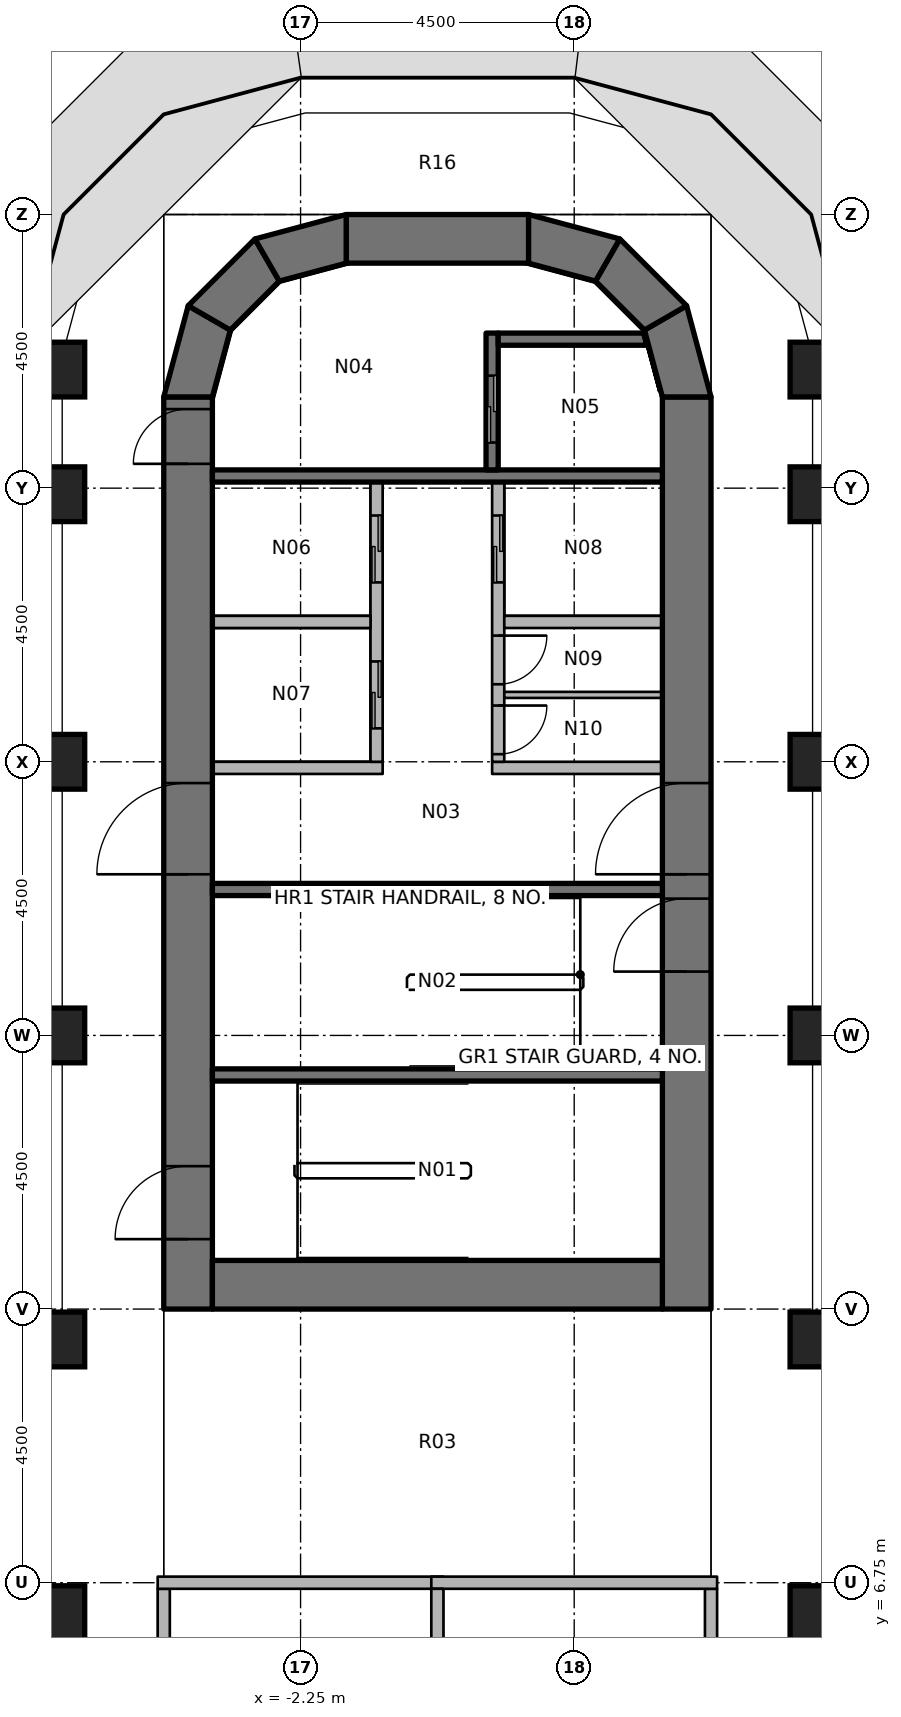
"""IFC4 building model, lengths in metres.
Left out: names, types, materials, properties, quantities, classifications, styles, units other than length and angle.
Written with IfcOpenShell. Run it as: python <this file> out.ifc"""

import sys

from ifc_helpers import new_model, si_unit, direction, frame, frame_2d, origin, origin_2d, place, context, subcontext, project, spatial, polyline, rectangle, outline, extrude, element, fill, save


model = new_model("IFC4")
c1 = context("Model", 3, precision=1e-05, world=origin(), true_north=direction((0.0, 1.0)))
c2 = subcontext(c1, "Body", "Model", "MODEL_VIEW")
j1 = project(units=[si_unit("LENGTHUNIT", "METRE"), si_unit("PLANEANGLEUNIT", "RADIAN")], contexts=[c1])
p1 = place(None, origin())
s1 = spatial("IfcSite", under=j1, at=p1, CompositionType="ELEMENT")
p2 = place(p1, origin())
s2 = spatial("IfcBuilding", under=s1, at=p2, CompositionType="ELEMENT")
p3 = place(p2, frame((0.0, 0.0, 128.4)))
s3 = spatial("IfcBuildingStorey", under=s2, at=p3, CompositionType="ELEMENT", Elevation=128.4)
for number, where, z_axis, x_axis in (
    (1, (-6.25, 6.25, 0.0), (0.0, 0.0, 1.0), (1.0, 0.0, 0.0)),
    (2, (-6.25, 10.75, 0.0), (0.0, 0.0, 1.0), (1.0, 0.0, 0.0)),
    (3, (-6.25, 15.75, 0.0), (0.0, 0.0, 1.0), (1.0, 0.0, 0.0)),
    (4, (-6.25, 20.25, 0.0), (0.0, 0.0, 1.0), (1.0, 0.0, 0.0)),
    (5, (-6.25, 24.65, 0.0), (0.0, 0.0, 1.0), (1.0, 0.0, 0.0)),
    (6, (-6.25, 26.7, 0.0), (0.0, 0.0, 1.0), (1.0, 0.0, 0.0)),
    (7, (6.25, 6.25, 0.0), (0.0, 0.0, 1.0), (1.0, 0.0, 0.0)),
    (8, (6.25, 10.75, 0.0), (0.0, 0.0, 1.0), (1.0, 0.0, 0.0)),
    (9, (6.25, 15.75, 0.0), (0.0, 0.0, 1.0), (1.0, 0.0, 0.0)),
    (10, (6.25, 20.25, 0.0), (0.0, 0.0, 1.0), (1.0, 0.0, 0.0)),
    (11, (6.25, 24.65, 0.0), (0.0, 0.0, 1.0), (1.0, 0.0, 0.0)),
    (12, (6.25, 26.7, 0.0), (0.0, 0.0, 1.0), (1.0, 0.0, 0.0)),
):
    element("IfcColumn", number, at=place(p3, frame(where, z_axis=z_axis, x_axis=x_axis)), inside=s3, PredefinedType="COLUMN", context=c2, shape_type="SweptSolid", body=[
        extrude(rectangle(XDim=0.9, YDim=0.9, at=origin_2d()), origin(), (0.0, 0.0, 1.0), 3.65),
    ])
p4 = place(p3, frame((-4.1, 11.25, 0.0), z_axis=(0.0, 0.0, 1.0), x_axis=(0.0, 1.0, 0.0)))
e13 = element("IfcWall", 13, at=p4, inside=s3, PredefinedType="SHEAR", context=c2, shape_type="SweptSolid", body=[
    extrude(rectangle(XDim=15.0, YDim=0.8, at=frame_2d((7.5, 0.0))), origin(), (0.0, 0.0, 1.0), 3.8),
])
p5 = place(p4, frame((7.15, 0.0, 0.0)))
e14 = element("IfcOpeningElement", 14, at=p5, cuts=e13, PredefinedType="OPENING", context=c2, shape_type="SweptSolid", body=[
    extrude(rectangle(XDim=1.5, YDim=2.3, at=frame_2d((0.75, 1.15))), frame((0.0, 0.41, 0.0), z_axis=(0.0, -1.0, 0.0), x_axis=(1.0, 0.0, 0.0)), (0.0, 0.0, 1.0), 0.82),
])
p6 = place(p4, frame((13.9, 0.0, 0.0)))
e15 = element("IfcOpeningElement", 15, at=p6, cuts=e13, PredefinedType="OPENING", context=c2, shape_type="SweptSolid", body=[
    extrude(rectangle(XDim=0.9, YDim=2.1, at=frame_2d((0.45, 1.05))), frame((0.0, 0.41, 0.0), z_axis=(0.0, -1.0, 0.0), x_axis=(1.0, 0.0, 0.0)), (0.0, 0.0, 1.0), 0.82),
])
p7 = place(p4, frame((1.15, 0.0, 0.0)))
e16 = element("IfcOpeningElement", 16, at=p7, cuts=e13, PredefinedType="OPENING", context=c2, shape_type="SweptSolid", body=[
    extrude(rectangle(XDim=1.2, YDim=2.1, at=frame_2d((0.6, 1.05))), frame((0.0, 0.41, 0.0), z_axis=(0.0, -1.0, 0.0), x_axis=(1.0, 0.0, 0.0)), (0.0, 0.0, 1.0), 0.82),
])
p8 = place(p3, frame((4.1, 11.25, 0.0), z_axis=(0.0, 0.0, 1.0), x_axis=(0.0, 1.0, 0.0)))
e17 = element("IfcWall", 17, at=p8, inside=s3, PredefinedType="SHEAR", context=c2, shape_type="SweptSolid", body=[
    extrude(rectangle(XDim=15.0, YDim=0.8, at=frame_2d((7.5, 0.0))), origin(), (0.0, 0.0, 1.0), 3.8),
])
p9 = place(p8, frame((7.15, 0.0, 0.0)))
e18 = element("IfcOpeningElement", 18, at=p9, cuts=e17, PredefinedType="OPENING", context=c2, shape_type="SweptSolid", body=[
    extrude(rectangle(XDim=1.5, YDim=2.3, at=frame_2d((0.75, 1.15))), frame((0.0, 0.41, 0.0), z_axis=(0.0, -1.0, 0.0), x_axis=(1.0, 0.0, 0.0)), (0.0, 0.0, 1.0), 0.82),
])
p10 = place(p8, frame((5.55, 0.0, 0.0)))
e19 = element("IfcOpeningElement", 19, at=p10, cuts=e17, PredefinedType="OPENING", context=c2, shape_type="SweptSolid", body=[
    extrude(rectangle(XDim=1.2, YDim=2.1, at=frame_2d((0.6, 1.05))), frame((0.0, 0.41, 0.0), z_axis=(0.0, -1.0, 0.0), x_axis=(1.0, 0.0, 0.0)), (0.0, 0.0, 1.0), 0.82),
])
p11 = place(p3, frame((-3.7, 11.65, 0.0), z_axis=(0.0, 0.0, 1.0), x_axis=(1.0, 0.0, 0.0)))
e20 = element("IfcWall", 20, at=p11, inside=s3, PredefinedType="SHEAR", context=c2, shape_type="SweptSolid", body=[
    extrude(rectangle(XDim=7.4, YDim=0.8, at=frame_2d((3.7, 0.0))), origin(), (0.0, 0.0, 1.0), 3.8),
])
p12 = place(p3, frame((-1.5, 28.85, 0.0), z_axis=(0.0, 0.0, 1.0), x_axis=(1.0, 0.0, 0.0)))
e21 = element("IfcWall", 21, at=p12, inside=s3, PredefinedType="SHEAR", context=c2, shape_type="SweptSolid", body=[
    extrude(rectangle(XDim=3.0, YDim=0.8, at=frame_2d((1.5, 0.0))), origin(), (0.0, 0.0, 1.0), 3.8),
])
p13 = place(p3, origin())
e22 = element("IfcWall", 22, at=p13, inside=s3, PredefinedType="SHEAR", context=c2, shape_type="SweptSolid", body=[
    extrude(outline(polyline([(-4.5, 26.25), (-4.098, 27.75), (-3.405, 27.35), (-3.7, 26.25), (-4.5, 26.25)])), origin(), (0.0, 0.0, 1.0), 3.8),
])
p14 = place(p3, origin())
e23 = element("IfcWall", 23, at=p14, inside=s3, PredefinedType="SHEAR", context=c2, shape_type="SweptSolid", body=[
    extrude(outline(polyline([(-4.098, 27.75), (-3.0, 28.848), (-2.6, 28.155), (-3.405, 27.35), (-4.098, 27.75)])), origin(), (0.0, 0.0, 1.0), 3.8),
])
p15 = place(p3, origin())
e24 = element("IfcWall", 24, at=p15, inside=s3, PredefinedType="SHEAR", context=c2, shape_type="SweptSolid", body=[
    extrude(outline(polyline([(-3.0, 28.848), (-1.5, 29.25), (-1.5, 28.45), (-2.6, 28.155), (-3.0, 28.848)])), origin(), (0.0, 0.0, 1.0), 3.8),
])
p16 = place(p3, origin())
e25 = element("IfcWall", 25, at=p16, inside=s3, PredefinedType="SHEAR", context=c2, shape_type="SweptSolid", body=[
    extrude(outline(polyline([(4.5, 26.25), (4.098, 27.75), (3.405, 27.35), (3.7, 26.25), (4.5, 26.25)])), origin(), (0.0, 0.0, 1.0), 3.8),
])
p17 = place(p3, origin())
e26 = element("IfcWall", 26, at=p17, inside=s3, PredefinedType="SHEAR", context=c2, shape_type="SweptSolid", body=[
    extrude(outline(polyline([(4.098, 27.75), (3.0, 28.848), (2.6, 28.155), (3.405, 27.35), (4.098, 27.75)])), origin(), (0.0, 0.0, 1.0), 3.8),
])
p18 = place(p3, origin())
e27 = element("IfcWall", 27, at=p18, inside=s3, PredefinedType="SHEAR", context=c2, shape_type="SweptSolid", body=[
    extrude(outline(polyline([(3.0, 28.848), (1.5, 29.25), (1.5, 28.45), (2.6, 28.155), (3.0, 28.848)])), origin(), (0.0, 0.0, 1.0), 3.8),
])
p19 = place(p3, frame((-3.7, 24.95, 0.0), z_axis=(0.0, 0.0, 1.0), x_axis=(1.0, 0.0, 0.0)))
e28 = element("IfcWall", 28, at=p19, inside=s3, PredefinedType="SHEAR", context=c2, shape_type="SweptSolid", body=[
    extrude(rectangle(XDim=7.4, YDim=0.2, at=frame_2d((3.7, 0.0))), origin(), (0.0, 0.0, 1.0), 3.65),
])
p20 = place(p3, frame((0.9, 27.3, 0.0), z_axis=(0.0, 0.0, 1.0), x_axis=(0.0, -1.0, 0.0)))
e29 = element("IfcWall", 29, at=p20, inside=s3, PredefinedType="SHEAR", context=c2, shape_type="SweptSolid", body=[
    extrude(rectangle(XDim=2.25, YDim=0.2, at=frame_2d((1.125, 0.0))), origin(), (0.0, 0.0, 1.0), 3.65),
])
p21 = place(p20, frame((0.7, 0.0, 0.0)))
e30 = element("IfcOpeningElement", 30, at=p21, cuts=e29, PredefinedType="OPENING", context=c2, shape_type="SweptSolid", body=[
    extrude(rectangle(XDim=1.1, YDim=2.3, at=frame_2d((0.55, 1.15))), frame((0.0, 0.11, 0.0), z_axis=(0.0, -1.0, 0.0), x_axis=(1.0, 0.0, 0.0)), (0.0, 0.0, 1.0), 0.22),
])
p22 = place(p3, origin())
e31 = element("IfcWall", 31, at=p22, inside=s3, PredefinedType="SHEAR", context=c2, shape_type="SweptSolid", body=[
    extrude(outline(polyline([(1.0, 27.1), (3.444, 27.1), (3.39, 27.3), (1.0, 27.3), (1.0, 27.1)])), origin(), (0.0, 0.0, 1.0), 3.65),
])
for number, where, z_axis, x_axis in (
    (32, (-3.7, 18.15, 0.0), (0.0, 0.0, 1.0), (1.0, 0.0, 0.0)),
    (33, (-3.7, 15.1, 0.0), (0.0, 0.0, 1.0), (1.0, 0.0, 0.0)),
):
    element("IfcWall", number, at=place(p3, frame(where, z_axis=z_axis, x_axis=x_axis)), inside=s3, PredefinedType="SHEAR", context=c2, shape_type="SweptSolid", body=[
        extrude(rectangle(XDim=7.4, YDim=0.2, at=frame_2d((3.7, 0.0))), origin(), (0.0, 0.0, 1.0), 3.65),
    ])
p23 = place(p3, frame((-3.7, 20.15, 0.0), z_axis=(0.0, 0.0, 1.0), x_axis=(1.0, 0.0, 0.0)))
e34 = element("IfcWall", 34, at=p23, inside=s3, PredefinedType="PARTITIONING", context=c2, shape_type="SweptSolid", body=[
    extrude(rectangle(XDim=2.8, YDim=0.2, at=frame_2d((1.4, 0.0))), origin(), (0.0, 0.0, 1.0), 3.65),
])
p24 = place(p3, frame((-1.0, 24.85, 0.0), z_axis=(0.0, 0.0, 1.0), x_axis=(0.0, -1.0, 0.0)))
e35 = element("IfcWall", 35, at=p24, inside=s3, PredefinedType="PARTITIONING", context=c2, shape_type="SweptSolid", body=[
    extrude(rectangle(XDim=4.6, YDim=0.2, at=frame_2d((2.3, 0.0))), origin(), (0.0, 0.0, 1.0), 3.65),
])
p25 = place(p24, frame((0.55, 0.0, 0.0)))
e36 = element("IfcOpeningElement", 36, at=p25, cuts=e35, PredefinedType="OPENING", context=c2, shape_type="SweptSolid", body=[
    extrude(rectangle(XDim=1.1, YDim=2.3, at=frame_2d((0.55, 1.15))), frame((0.0, 0.11, 0.0), z_axis=(0.0, -1.0, 0.0), x_axis=(1.0, 0.0, 0.0)), (0.0, 0.0, 1.0), 0.22),
])
p26 = place(p24, frame((2.95, 0.0, 0.0)))
e37 = element("IfcOpeningElement", 37, at=p26, cuts=e35, PredefinedType="OPENING", context=c2, shape_type="SweptSolid", body=[
    extrude(rectangle(XDim=1.1, YDim=2.3, at=frame_2d((0.55, 1.15))), frame((0.0, 0.11, 0.0), z_axis=(0.0, -1.0, 0.0), x_axis=(1.0, 0.0, 0.0)), (0.0, 0.0, 1.0), 0.22),
])
p27 = place(p3, frame((0.9, 20.15, 0.0), z_axis=(0.0, 0.0, 1.0), x_axis=(1.0, 0.0, 0.0)))
e38 = element("IfcWall", 38, at=p27, inside=s3, PredefinedType="PARTITIONING", context=c2, shape_type="SweptSolid", body=[
    extrude(rectangle(XDim=2.8, YDim=0.2, at=frame_2d((1.4, 0.0))), origin(), (0.0, 0.0, 1.0), 3.65),
])
p28 = place(p3, frame((1.0, 24.85, 0.0), z_axis=(0.0, 0.0, 1.0), x_axis=(0.0, -1.0, 0.0)))
e39 = element("IfcWall", 39, at=p28, inside=s3, PredefinedType="PARTITIONING", context=c2, shape_type="SweptSolid", body=[
    extrude(rectangle(XDim=4.6, YDim=0.2, at=frame_2d((2.3, 0.0))), origin(), (0.0, 0.0, 1.0), 3.65),
])
p29 = place(p28, frame((0.55, 0.0, 0.0)))
e40 = element("IfcOpeningElement", 40, at=p29, cuts=e39, PredefinedType="OPENING", context=c2, shape_type="SweptSolid", body=[
    extrude(rectangle(XDim=1.1, YDim=2.3, at=frame_2d((0.55, 1.15))), frame((0.0, 0.11, 0.0), z_axis=(0.0, -1.0, 0.0), x_axis=(1.0, 0.0, 0.0)), (0.0, 0.0, 1.0), 0.22),
])
p30 = place(p28, frame((2.525, 0.0, 0.0)))
e41 = element("IfcOpeningElement", 41, at=p30, cuts=e39, PredefinedType="OPENING", context=c2, shape_type="SweptSolid", body=[
    extrude(rectangle(XDim=0.8, YDim=2.1, at=frame_2d((0.4, 1.05))), frame((0.0, 0.11, 0.0), z_axis=(0.0, -1.0, 0.0), x_axis=(1.0, 0.0, 0.0)), (0.0, 0.0, 1.0), 0.22),
])
p31 = place(p28, frame((3.675, 0.0, 0.0)))
e42 = element("IfcOpeningElement", 42, at=p31, cuts=e39, PredefinedType="OPENING", context=c2, shape_type="SweptSolid", body=[
    extrude(rectangle(XDim=0.8, YDim=2.1, at=frame_2d((0.4, 1.05))), frame((0.0, 0.11, 0.0), z_axis=(0.0, -1.0, 0.0), x_axis=(1.0, 0.0, 0.0)), (0.0, 0.0, 1.0), 0.22),
])
for number, where, z_axis, x_axis in (
    (43, (-3.7, 22.55, 0.0), (0.0, 0.0, 1.0), (1.0, 0.0, 0.0)),
    (44, (1.1, 22.55, 0.0), (0.0, 0.0, 1.0), (1.0, 0.0, 0.0)),
):
    element("IfcWall", number, at=place(p3, frame(where, z_axis=z_axis, x_axis=x_axis)), inside=s3, PredefinedType="PARTITIONING", context=c2, shape_type="SweptSolid", body=[
        extrude(rectangle(XDim=2.6, YDim=0.2, at=frame_2d((1.3, 0.0))), origin(), (0.0, 0.0, 1.0), 3.65),
    ])
p32 = place(p3, frame((1.1, 21.35, 0.0), z_axis=(0.0, 0.0, 1.0), x_axis=(1.0, 0.0, 0.0)))
e45 = element("IfcWall", 45, at=p32, inside=s3, PredefinedType="PARTITIONING", context=c2, shape_type="SweptSolid", body=[
    extrude(rectangle(XDim=2.6, YDim=0.1, at=frame_2d((1.3, 0.0))), origin(), (0.0, 0.0, 1.0), 3.65),
])
p33 = place(p3, frame((-4.5, 6.65, 0.0), z_axis=(0.0, 0.0, 1.0), x_axis=(0.0, -1.0, 0.0)))
e46 = element("IfcWall", 46, at=p33, inside=s3, PredefinedType="PARTITIONING", context=c2, shape_type="SweptSolid", body=[
    extrude(rectangle(XDim=13.3, YDim=0.2, at=frame_2d((6.65, 0.0))), origin(), (0.0, 0.0, 1.0), 2.738),
])
p34 = place(p33, frame((6.15, 0.0, 0.0)))
e47 = element("IfcOpeningElement", 47, at=p34, cuts=e46, PredefinedType="OPENING", context=c2, shape_type="SweptSolid", body=[
    extrude(rectangle(XDim=1.0, YDim=2.1, at=frame_2d((0.5, 1.05))), frame((0.0, 0.11, 0.0), z_axis=(0.0, -1.0, 0.0), x_axis=(1.0, 0.0, 0.0)), (0.0, 0.0, 1.0), 0.22),
])
p35 = place(p3, frame((4.5, -6.65, 0.0), z_axis=(0.0, 0.0, 1.0), x_axis=(0.0, 1.0, 0.0)))
e48 = element("IfcWall", 48, at=p35, inside=s3, PredefinedType="PARTITIONING", context=c2, shape_type="SweptSolid", body=[
    extrude(rectangle(XDim=13.3, YDim=0.2, at=frame_2d((6.65, 0.0))), origin(), (0.0, 0.0, 1.0), 2.738),
])
p36 = place(p35, frame((6.15, 0.0, 0.0)))
e49 = element("IfcOpeningElement", 49, at=p36, cuts=e48, PredefinedType="OPENING", context=c2, shape_type="SweptSolid", body=[
    extrude(rectangle(XDim=1.0, YDim=2.1, at=frame_2d((0.5, 1.05))), frame((0.0, 0.11, 0.0), z_axis=(0.0, -1.0, 0.0), x_axis=(1.0, 0.0, 0.0)), (0.0, 0.0, 1.0), 0.22),
])
for number, where, z_axis, x_axis in (
    (50, (-4.6, 6.75, 0.0), (0.0, 0.0, 1.0), (1.0, 0.0, 0.0)),
    (51, (-0.1, 6.75, 0.0), (0.0, 0.0, 1.0), (1.0, 0.0, 0.0)),
):
    element("IfcWall", number, at=place(p3, frame(where, z_axis=z_axis, x_axis=x_axis)), inside=s3, PredefinedType="PARTITIONING", context=c2, shape_type="SweptSolid", body=[
        extrude(rectangle(XDim=4.7, YDim=0.2, at=frame_2d((2.35, 0.0))), origin(), (0.0, 0.0, 1.0), 2.738),
    ])
p37 = place(p3, frame((0.0, -6.65, 0.0), z_axis=(0.0, 0.0, 1.0), x_axis=(0.0, 1.0, 0.0)))
e52 = element("IfcWall", 52, at=p37, inside=s3, PredefinedType="PARTITIONING", context=c2, shape_type="SweptSolid", body=[
    extrude(rectangle(XDim=13.3, YDim=0.2, at=frame_2d((6.65, 0.0))), origin(), (0.0, 0.0, 1.0), 2.738),
])
p38 = place(p5, origin())
e53 = element("IfcDoor", 53, at=p38, inside=s3, OperationType="DOUBLE_DOOR_SINGLE_SWING", PredefinedType="DOOR", context=c2, shape_type="SweptSolid", body=[
    extrude(rectangle(XDim=1.5, YDim=2.3, at=frame_2d((0.75, 1.15))), frame((0.0, 0.025, 0.0), z_axis=(0.0, -1.0, 0.0), x_axis=(1.0, 0.0, 0.0)), (0.0, 0.0, 1.0), 0.05),
])
fill(e14, e53)
p39 = place(p9, origin())
e54 = element("IfcDoor", 54, at=p39, inside=s3, OperationType="DOUBLE_DOOR_SINGLE_SWING", PredefinedType="DOOR", context=c2, shape_type="SweptSolid", body=[
    extrude(rectangle(XDim=1.5, YDim=2.3, at=frame_2d((0.75, 1.15))), frame((0.0, 0.025, 0.0), z_axis=(0.0, -1.0, 0.0), x_axis=(1.0, 0.0, 0.0)), (0.0, 0.0, 1.0), 0.05),
])
fill(e18, e54)
p40 = place(p6, origin())
e55 = element("IfcDoor", 55, at=p40, inside=s3, OperationType="SINGLE_SWING_LEFT", PredefinedType="DOOR", context=c2, shape_type="SweptSolid", body=[
    extrude(rectangle(XDim=0.9, YDim=2.1, at=frame_2d((0.45, 1.05))), frame((0.0, 0.025, 0.0), z_axis=(0.0, -1.0, 0.0), x_axis=(1.0, 0.0, 0.0)), (0.0, 0.0, 1.0), 0.05),
])
fill(e15, e55)
p41 = place(p10, origin())
e56 = element("IfcDoor", 56, at=p41, inside=s3, OperationType="SINGLE_SWING_RIGHT", PredefinedType="DOOR", context=c2, shape_type="SweptSolid", body=[
    extrude(rectangle(XDim=1.2, YDim=2.1, at=frame_2d((0.6, 1.05))), frame((0.0, 0.025, 0.0), z_axis=(0.0, -1.0, 0.0), x_axis=(1.0, 0.0, 0.0)), (0.0, 0.0, 1.0), 0.05),
])
fill(e19, e56)
p42 = place(p7, origin())
e57 = element("IfcDoor", 57, at=p42, inside=s3, OperationType="SINGLE_SWING_LEFT", PredefinedType="DOOR", context=c2, shape_type="SweptSolid", body=[
    extrude(rectangle(XDim=1.2, YDim=2.1, at=frame_2d((0.6, 1.05))), frame((0.0, 0.025, 0.0), z_axis=(0.0, -1.0, 0.0), x_axis=(1.0, 0.0, 0.0)), (0.0, 0.0, 1.0), 0.05),
])
fill(e16, e57)
p43 = place(p21, origin())
e58 = element("IfcDoor", 58, at=p43, inside=s3, OperationType="DOUBLE_DOOR_SLIDING", PredefinedType="DOOR", context=c2, shape_type="SweptSolid", body=[
    extrude(rectangle(XDim=1.1, YDim=2.3, at=frame_2d((0.55, 1.15))), frame((0.0, 0.025, 0.0), z_axis=(0.0, -1.0, 0.0), x_axis=(1.0, 0.0, 0.0)), (0.0, 0.0, 1.0), 0.05),
])
fill(e30, e58)
p44 = place(p25, origin())
e59 = element("IfcDoor", 59, at=p44, inside=s3, OperationType="DOUBLE_DOOR_SLIDING", PredefinedType="DOOR", context=c2, shape_type="SweptSolid", body=[
    extrude(rectangle(XDim=1.1, YDim=2.3, at=frame_2d((0.55, 1.15))), frame((0.0, 0.025, 0.0), z_axis=(0.0, -1.0, 0.0), x_axis=(1.0, 0.0, 0.0)), (0.0, 0.0, 1.0), 0.05),
])
fill(e36, e59)
p45 = place(p26, origin())
e60 = element("IfcDoor", 60, at=p45, inside=s3, OperationType="DOUBLE_DOOR_SLIDING", PredefinedType="DOOR", context=c2, shape_type="SweptSolid", body=[
    extrude(rectangle(XDim=1.1, YDim=2.3, at=frame_2d((0.55, 1.15))), frame((0.0, 0.025, 0.0), z_axis=(0.0, -1.0, 0.0), x_axis=(1.0, 0.0, 0.0)), (0.0, 0.0, 1.0), 0.05),
])
fill(e37, e60)
p46 = place(p29, origin())
e61 = element("IfcDoor", 61, at=p46, inside=s3, OperationType="DOUBLE_DOOR_SLIDING", PredefinedType="DOOR", context=c2, shape_type="SweptSolid", body=[
    extrude(rectangle(XDim=1.1, YDim=2.3, at=frame_2d((0.55, 1.15))), frame((0.0, 0.025, 0.0), z_axis=(0.0, -1.0, 0.0), x_axis=(1.0, 0.0, 0.0)), (0.0, 0.0, 1.0), 0.05),
])
fill(e40, e61)
p47 = place(p30, origin())
e62 = element("IfcDoor", 62, at=p47, inside=s3, OperationType="SINGLE_SWING_RIGHT", PredefinedType="DOOR", context=c2, shape_type="SweptSolid", body=[
    extrude(rectangle(XDim=0.8, YDim=2.1, at=frame_2d((0.4, 1.05))), frame((0.0, 0.025, 0.0), z_axis=(0.0, -1.0, 0.0), x_axis=(1.0, 0.0, 0.0)), (0.0, 0.0, 1.0), 0.05),
])
fill(e41, e62)
p48 = place(p31, origin())
e63 = element("IfcDoor", 63, at=p48, inside=s3, OperationType="SINGLE_SWING_LEFT", PredefinedType="DOOR", context=c2, shape_type="SweptSolid", body=[
    extrude(rectangle(XDim=0.8, YDim=2.1, at=frame_2d((0.4, 1.05))), frame((0.0, 0.025, 0.0), z_axis=(0.0, -1.0, 0.0), x_axis=(1.0, 0.0, 0.0)), (0.0, 0.0, 1.0), 0.05),
])
fill(e42, e63)
save(model, sys.argv[1])
